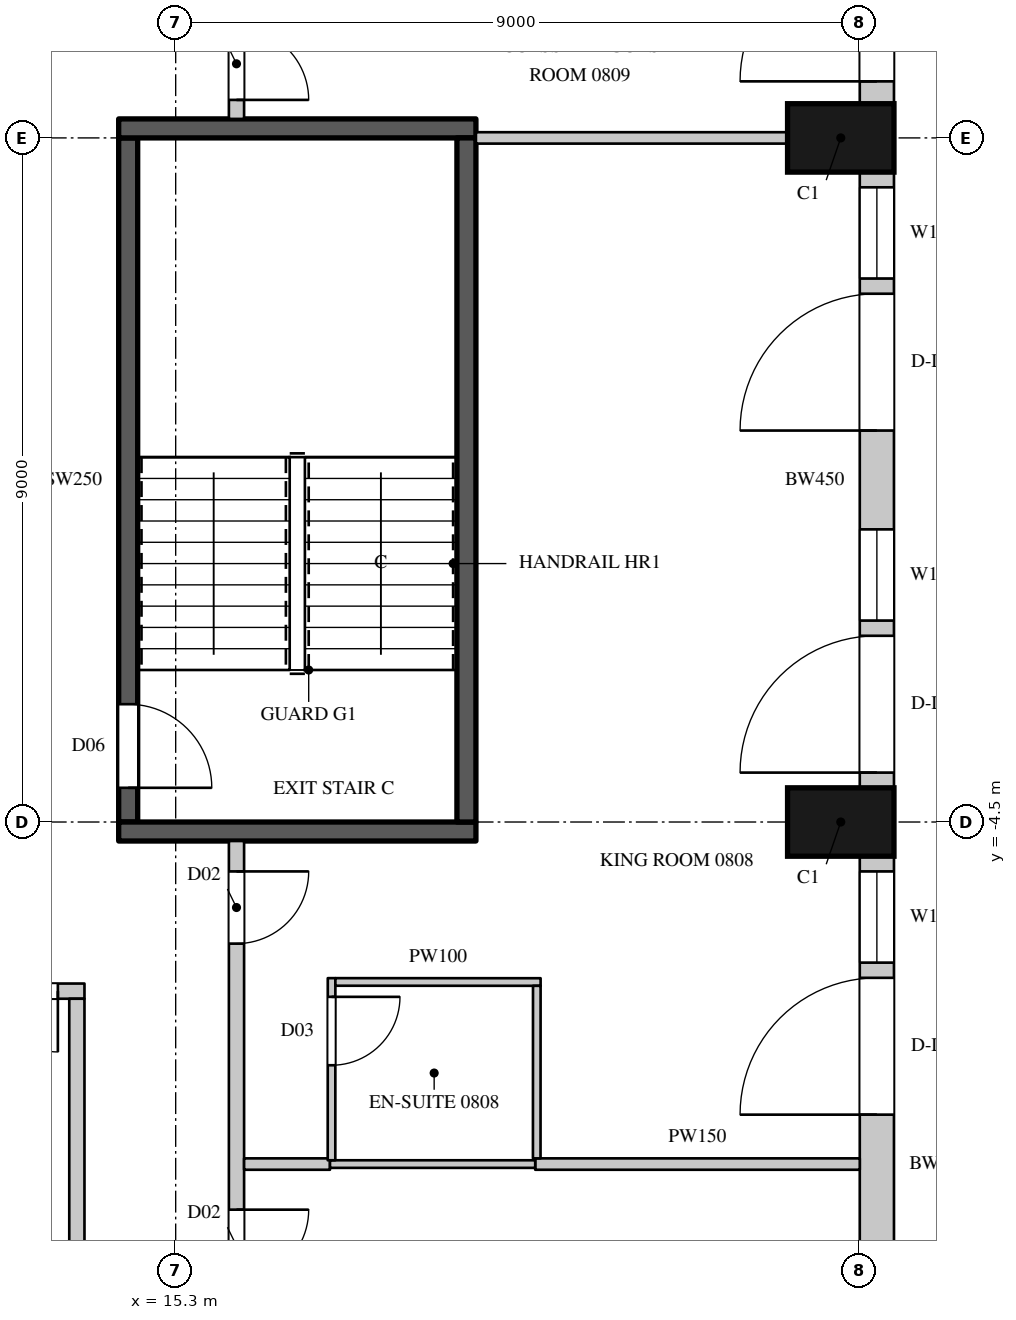
"""IFC4 building model, lengths in metres.
Left out: names, types, materials, properties, quantities, classifications, styles, units other than length and angle.
Written with IfcOpenShell. Run it as: python <this file> out.ifc"""

import sys

from ifc_helpers import new_model, si_unit, direction, frame, frame_2d, origin, origin_2d, place, context, subcontext, project, spatial, rectangle, extrude, element, fill, save


model = new_model("IFC4")
c1 = context("Model", 3, precision=1e-05, world=origin(), true_north=direction((0.0, 1.0)))
c2 = subcontext(c1, "Body", "Model", "MODEL_VIEW")
j1 = project(units=[si_unit("LENGTHUNIT", "METRE"), si_unit("PLANEANGLEUNIT", "RADIAN")], contexts=[c1])
p1 = place(None, origin())
s1 = spatial("IfcSite", under=j1, at=p1, CompositionType="ELEMENT")
p2 = place(p1, origin())
s2 = spatial("IfcBuilding", under=s1, at=p2, CompositionType="ELEMENT")
p3 = place(p2, frame((0.0, 0.0, 59.1)))
s3 = spatial("IfcBuildingStorey", under=s2, at=p3, CompositionType="ELEMENT", Elevation=59.1)
for number, where, z_axis, x_axis in (
    (1, (24.05, -4.5, 0.0), (0.0, 0.0, 1.0), (0.0, 1.0, 0.0)),
    (2, (24.05, 4.5, 0.0), (0.0, 0.0, 1.0), (0.0, 1.0, 0.0)),
):
    element("IfcColumn", number, at=place(p3, frame(where, z_axis=z_axis, x_axis=x_axis)), inside=s3, PredefinedType="COLUMN", context=c2, shape_type="SweptSolid", body=[
        extrude(rectangle(XDim=0.9, YDim=1.4, at=origin_2d()), origin(), (0.0, 0.0, 1.0), 3.6),
    ])
p4 = place(p3, frame((24.525, -13.05, 0.0), z_axis=(0.0, 0.0, 1.0), x_axis=(0.0, 1.0, 0.0)))
e3 = element("IfcWall", 3, at=p4, inside=s3, PredefinedType="SOLIDWALL", context=c2, shape_type="SweptSolid", body=[
    extrude(rectangle(XDim=8.1, YDim=0.45, at=frame_2d((4.05, 0.0))), origin(), (0.0, 0.0, 1.0), 3.3),
])
p5 = place(p4, frame((0.9, 0.0, 0.0)))
e4 = element("IfcOpeningElement", 4, at=p5, cuts=e3, PredefinedType="OPENING", context=c2, shape_type="SweptSolid", body=[
    extrude(rectangle(XDim=1.8, YDim=2.4, at=frame_2d((0.9, 1.2))), frame((0.0, 0.235, 0.0), z_axis=(0.0, -1.0, 0.0), x_axis=(1.0, 0.0, 0.0)), (0.0, 0.0, 1.0), 0.47),
])
p6 = place(p4, frame((4.7, 0.0, 0.0)))
e5 = element("IfcOpeningElement", 5, at=p6, cuts=e3, PredefinedType="OPENING", context=c2, shape_type="SweptSolid", body=[
    extrude(rectangle(XDim=1.8, YDim=2.4, at=frame_2d((0.9, 1.2))), frame((0.0, 0.235, 0.0), z_axis=(0.0, -1.0, 0.0), x_axis=(1.0, 0.0, 0.0)), (0.0, 0.0, 1.0), 0.47),
])
p7 = place(p4, frame((6.7, 0.0, 1.05)))
e6 = element("IfcOpeningElement", 6, at=p7, cuts=e3, PredefinedType="OPENING", context=c2, shape_type="SweptSolid", body=[
    extrude(rectangle(XDim=1.2, YDim=2.0, at=frame_2d((0.6, 1.0))), frame((0.0, 0.235, 0.0), z_axis=(0.0, -1.0, 0.0), x_axis=(1.0, 0.0, 0.0)), (0.0, 0.0, 1.0), 0.47),
])
p8 = place(p3, frame((24.525, -4.05, 0.0), z_axis=(0.0, 0.0, 1.0), x_axis=(0.0, 1.0, 0.0)))
e7 = element("IfcWall", 7, at=p8, inside=s3, PredefinedType="SOLIDWALL", context=c2, shape_type="SweptSolid", body=[
    extrude(rectangle(XDim=8.1, YDim=0.45, at=frame_2d((4.05, 0.0))), origin(), (0.0, 0.0, 1.0), 3.3),
])
p9 = place(p8, frame((0.2, 0.0, 0.0)))
e8 = element("IfcOpeningElement", 8, at=p9, cuts=e7, PredefinedType="OPENING", context=c2, shape_type="SweptSolid", body=[
    extrude(rectangle(XDim=1.8, YDim=2.4, at=frame_2d((0.9, 1.2))), frame((0.0, 0.235, 0.0), z_axis=(0.0, -1.0, 0.0), x_axis=(1.0, 0.0, 0.0)), (0.0, 0.0, 1.0), 0.47),
])
p10 = place(p8, frame((2.2, 0.0, 1.05)))
e9 = element("IfcOpeningElement", 9, at=p10, cuts=e7, PredefinedType="OPENING", context=c2, shape_type="SweptSolid", body=[
    extrude(rectangle(XDim=1.2, YDim=2.0, at=frame_2d((0.6, 1.0))), frame((0.0, 0.235, 0.0), z_axis=(0.0, -1.0, 0.0), x_axis=(1.0, 0.0, 0.0)), (0.0, 0.0, 1.0), 0.47),
])
p11 = place(p8, frame((4.7, 0.0, 0.0)))
e10 = element("IfcOpeningElement", 10, at=p11, cuts=e7, PredefinedType="OPENING", context=c2, shape_type="SweptSolid", body=[
    extrude(rectangle(XDim=1.8, YDim=2.4, at=frame_2d((0.9, 1.2))), frame((0.0, 0.235, 0.0), z_axis=(0.0, -1.0, 0.0), x_axis=(1.0, 0.0, 0.0)), (0.0, 0.0, 1.0), 0.47),
])
p12 = place(p8, frame((6.7, 0.0, 1.05)))
e11 = element("IfcOpeningElement", 11, at=p12, cuts=e7, PredefinedType="OPENING", context=c2, shape_type="SweptSolid", body=[
    extrude(rectangle(XDim=1.2, YDim=2.0, at=frame_2d((0.6, 1.0))), frame((0.0, 0.235, 0.0), z_axis=(0.0, -1.0, 0.0), x_axis=(1.0, 0.0, 0.0)), (0.0, 0.0, 1.0), 0.47),
])
p13 = place(p3, frame((24.525, 4.95, 0.0), z_axis=(0.0, 0.0, 1.0), x_axis=(0.0, 1.0, 0.0)))
e12 = element("IfcWall", 12, at=p13, inside=s3, PredefinedType="SOLIDWALL", context=c2, shape_type="SweptSolid", body=[
    extrude(rectangle(XDim=8.439, YDim=0.45, at=frame_2d((4.219, 0.0))), origin(), (0.0, 0.0, 1.0), 3.3),
])
p14 = place(p13, frame((0.294, 0.0, 0.0)))
e13 = element("IfcOpeningElement", 13, at=p14, cuts=e12, PredefinedType="OPENING", context=c2, shape_type="SweptSolid", body=[
    extrude(rectangle(XDim=1.8, YDim=2.4, at=frame_2d((0.9, 1.2))), frame((0.0, 0.235, 0.0), z_axis=(0.0, -1.0, 0.0), x_axis=(1.0, 0.0, 0.0)), (0.0, 0.0, 1.0), 0.47),
])
p15 = place(p13, frame((2.294, 0.0, 1.05)))
e14 = element("IfcOpeningElement", 14, at=p15, cuts=e12, PredefinedType="OPENING", context=c2, shape_type="SweptSolid", body=[
    extrude(rectangle(XDim=1.2, YDim=2.0, at=frame_2d((0.6, 1.0))), frame((0.0, 0.235, 0.0), z_axis=(0.0, -1.0, 0.0), x_axis=(1.0, 0.0, 0.0)), (0.0, 0.0, 1.0), 0.47),
])
p16 = place(p13, frame((5.232, 0.0, 1.05)))
e15 = element("IfcOpeningElement", 15, at=p16, cuts=e12, PredefinedType="OPENING", context=c2, shape_type="SweptSolid", body=[
    extrude(rectangle(XDim=2.7, YDim=2.0, at=frame_2d((1.35, 1.0))), frame((0.0, 0.235, 0.0), z_axis=(0.0, -1.0, 0.0), x_axis=(1.0, 0.0, 0.0)), (0.0, 0.0, 1.0), 0.47),
])
p17 = place(p3, frame((10.5, -6.725, 0.0), z_axis=(0.0, 0.0, 1.0), x_axis=(1.0, 0.0, 0.0)))
e16 = element("IfcWall", 16, at=p17, inside=s3, PredefinedType="PARTITIONING", context=c2, shape_type="SweptSolid", body=[
    extrude(rectangle(XDim=3.6, YDim=0.2, at=frame_2d((1.8, 0.0))), origin(), (0.0, 0.0, 1.0), 3.3),
])
p18 = place(p17, frame((1.65, 0.0, 0.0)))
e17 = element("IfcOpeningElement", 17, at=p18, cuts=e16, PredefinedType="OPENING", context=c2, shape_type="SweptSolid", body=[
    extrude(rectangle(XDim=1.6, YDim=2.4, at=frame_2d((0.8, 1.2))), frame((0.0, 0.11, 0.0), z_axis=(0.0, -1.0, 0.0), x_axis=(1.0, 0.0, 0.0)), (0.0, 0.0, 1.0), 0.22),
])
p19 = place(p3, frame((14.0, -15.3, 0.0), z_axis=(0.0, 0.0, 1.0), x_axis=(0.0, 1.0, 0.0)))
e18 = element("IfcWall", 18, at=p19, inside=s3, PredefinedType="PARTITIONING", context=c2, shape_type="SweptSolid", body=[
    extrude(rectangle(XDim=8.475, YDim=0.2, at=frame_2d((4.238, 0.0))), origin(), (0.0, 0.0, 1.0), 3.3),
])
p20 = place(p3, frame((16.1, -17.5, 0.0), z_axis=(0.0, 0.0, 1.0), x_axis=(0.0, 1.0, 0.0)))
e19 = element("IfcWall", 19, at=p20, inside=s3, PredefinedType="PARTITIONING", context=c2, shape_type="SweptSolid", body=[
    extrude(rectangle(XDim=12.75, YDim=0.2, at=frame_2d((6.375, 0.0))), origin(), (0.0, 0.0, 1.0), 3.3),
])
p21 = place(p20, frame((2.75, 0.0, 0.0)))
e20 = element("IfcOpeningElement", 20, at=p21, cuts=e19, PredefinedType="OPENING", context=c2, shape_type="SweptSolid", body=[
    extrude(rectangle(XDim=0.95, YDim=2.2, at=frame_2d((0.475, 1.1))), frame((0.0, 0.11, 0.0), z_axis=(0.0, -1.0, 0.0), x_axis=(1.0, 0.0, 0.0)), (0.0, 0.0, 1.0), 0.22),
])
p22 = place(p20, frame((6.95, 0.0, 0.0)))
e21 = element("IfcOpeningElement", 21, at=p22, cuts=e19, PredefinedType="OPENING", context=c2, shape_type="SweptSolid", body=[
    extrude(rectangle(XDim=0.95, YDim=2.2, at=frame_2d((0.475, 1.1))), frame((0.0, 0.11, 0.0), z_axis=(0.0, -1.0, 0.0), x_axis=(1.0, 0.0, 0.0)), (0.0, 0.0, 1.0), 0.22),
])
p23 = place(p20, frame((11.4, 0.0, 0.0)))
e22 = element("IfcOpeningElement", 22, at=p23, cuts=e19, PredefinedType="OPENING", context=c2, shape_type="SweptSolid", body=[
    extrude(rectangle(XDim=0.95, YDim=2.2, at=frame_2d((0.475, 1.1))), frame((0.0, 0.11, 0.0), z_axis=(0.0, -1.0, 0.0), x_axis=(1.0, 0.0, 0.0)), (0.0, 0.0, 1.0), 0.22),
])
p24 = place(p3, frame((16.1, 4.75, 0.0), z_axis=(0.0, 0.0, 1.0), x_axis=(0.0, 1.0, 0.0)))
e23 = element("IfcWall", 23, at=p24, inside=s3, PredefinedType="PARTITIONING", context=c2, shape_type="SweptSolid", body=[
    extrude(rectangle(XDim=12.65, YDim=0.2, at=frame_2d((6.325, 0.0))), origin(), (0.0, 0.0, 1.0), 3.3),
])
p25 = place(p24, frame((0.25, 0.0, 0.0)))
e24 = element("IfcOpeningElement", 24, at=p25, cuts=e23, PredefinedType="OPENING", context=c2, shape_type="SweptSolid", body=[
    extrude(rectangle(XDim=0.95, YDim=2.2, at=frame_2d((0.475, 1.1))), frame((0.0, 0.11, 0.0), z_axis=(0.0, -1.0, 0.0), x_axis=(1.0, 0.0, 0.0)), (0.0, 0.0, 1.0), 0.22),
])
p26 = place(p24, frame((6.9, 0.0, 0.0)))
e25 = element("IfcOpeningElement", 25, at=p26, cuts=e23, PredefinedType="OPENING", context=c2, shape_type="SweptSolid", body=[
    extrude(rectangle(XDim=0.95, YDim=2.2, at=frame_2d((0.475, 1.1))), frame((0.0, 0.11, 0.0), z_axis=(0.0, -1.0, 0.0), x_axis=(1.0, 0.0, 0.0)), (0.0, 0.0, 1.0), 0.22),
])
p27 = place(p3, frame((16.2, -9.0, 0.0), z_axis=(0.0, 0.0, 1.0), x_axis=(1.0, 0.0, 0.0)))
e26 = element("IfcWall", 26, at=p27, inside=s3, PredefinedType="PARTITIONING", context=c2, shape_type="SweptSolid", body=[
    extrude(rectangle(XDim=1.13, YDim=0.15, at=frame_2d((0.565, 0.0))), origin(), (0.0, 0.0, 1.0), 2.65),
])
p28 = place(p3, frame((19.25, 4.5, 0.0), z_axis=(0.0, 0.0, 1.0), x_axis=(1.0, 0.0, 0.0)))
e27 = element("IfcWall", 27, at=p28, inside=s3, PredefinedType="PARTITIONING", context=c2, shape_type="SweptSolid", body=[
    extrude(rectangle(XDim=4.1, YDim=0.15, at=frame_2d((2.05, 0.0))), origin(), (0.0, 0.0, 1.0), 3.3),
])
p29 = place(p3, frame((20.03, -9.0, 0.0), z_axis=(0.0, 0.0, 1.0), x_axis=(1.0, 0.0, 0.0)))
e28 = element("IfcWall", 28, at=p29, inside=s3, PredefinedType="PARTITIONING", context=c2, shape_type="SweptSolid", body=[
    extrude(rectangle(XDim=4.27, YDim=0.15, at=frame_2d((2.135, 0.0))), origin(), (0.0, 0.0, 1.0), 2.65),
])
p30 = place(p3, frame((14.675, -4.5, 0.0), z_axis=(0.0, 0.0, 1.0), x_axis=(0.0, 1.0, 0.0)))
e29 = element("IfcWall", 29, at=p30, inside=s3, PredefinedType="SHEAR", context=c2, shape_type="SweptSolid", body=[
    extrude(rectangle(XDim=9.0, YDim=0.25, at=frame_2d((4.5, 0.0))), origin(), (0.0, 0.0, 1.0), 3.3),
])
p31 = place(p30, frame((0.45, 0.0, 0.0)))
e30 = element("IfcOpeningElement", 30, at=p31, cuts=e29, PredefinedType="OPENING", context=c2, shape_type="SweptSolid", body=[
    extrude(rectangle(XDim=1.1, YDim=2.2, at=frame_2d((0.55, 1.1))), frame((0.0, 0.135, 0.0), z_axis=(0.0, -1.0, 0.0), x_axis=(1.0, 0.0, 0.0)), (0.0, 0.0, 1.0), 0.27),
])
for number, where, z_axis, x_axis in (
    (31, (14.55, -4.625, 0.0), (0.0, 0.0, 1.0), (1.0, 0.0, 0.0)),
    (32, (14.55, 4.625, 0.0), (0.0, 0.0, 1.0), (1.0, 0.0, 0.0)),
):
    element("IfcWall", number, at=place(p3, frame(where, z_axis=z_axis, x_axis=x_axis)), inside=s3, PredefinedType="SHEAR", context=c2, shape_type="SweptSolid", body=[
        extrude(rectangle(XDim=4.7, YDim=0.25, at=frame_2d((2.35, 0.0))), origin(), (0.0, 0.0, 1.0), 3.3),
    ])
p32 = place(p3, frame((19.125, -4.5, 0.0), z_axis=(0.0, 0.0, 1.0), x_axis=(0.0, 1.0, 0.0)))
e33 = element("IfcWall", 33, at=p32, inside=s3, PredefinedType="SHEAR", context=c2, shape_type="SweptSolid", body=[
    extrude(rectangle(XDim=9.0, YDim=0.25, at=frame_2d((4.5, 0.0))), origin(), (0.0, 0.0, 1.0), 3.3),
])
p33 = place(p3, frame((17.33, -9.0, 0.0), z_axis=(0.0, 0.0, 1.0), x_axis=(1.0, 0.0, 0.0)))
e34 = element("IfcWall", 34, at=p33, inside=s3, PredefinedType="PARTITIONING", context=c2, shape_type="SweptSolid", body=[
    extrude(rectangle(XDim=2.7, YDim=0.1, at=frame_2d((1.35, 0.0))), origin(), (0.0, 0.0, 1.0), 2.65),
])
p34 = place(p3, frame((17.35, -8.95, 0.0), z_axis=(0.0, 0.0, 1.0), x_axis=(0.000407580973, 0.999999916939, 0.0)))
e35 = element("IfcWall", 35, at=p34, inside=s3, PredefinedType="PARTITIONING", context=c2, shape_type="SweptSolid", body=[
    extrude(rectangle(XDim=2.396, YDim=0.1, at=frame_2d((1.198, 0.0))), origin(), (0.0, 0.0, 1.0), 3.3),
])
p35 = place(p34, frame((1.25, 0.0, 0.0)))
e36 = element("IfcOpeningElement", 36, at=p35, cuts=e35, PredefinedType="OPENING", context=c2, shape_type="SweptSolid", body=[
    extrude(rectangle(XDim=0.9, YDim=2.2, at=frame_2d((0.45, 1.1))), frame((0.0, 0.06, 0.0), z_axis=(0.0, -1.0, 0.0), x_axis=(1.0, 0.0, 0.0)), (0.0, 0.0, 1.0), 0.12),
])
p36 = place(p3, frame((17.401, -6.604, 0.0), z_axis=(0.0, 0.0, 1.0), x_axis=(0.9999999346, -0.000361663629, 0.0)))
e37 = element("IfcWall", 37, at=p36, inside=s3, PredefinedType="PARTITIONING", context=c2, shape_type="SweptSolid", body=[
    extrude(rectangle(XDim=2.7, YDim=0.1, at=frame_2d((1.35, 0.0))), origin(), (0.0, 0.0, 1.0), 3.3),
])
p37 = place(p3, frame((20.05, -8.925, 0.0), z_axis=(0.0, 0.0, 1.0), x_axis=(0.000430200003, 0.999999907464, 0.0)))
e38 = element("IfcWall", 38, at=p37, inside=s3, PredefinedType="PARTITIONING", context=c2, shape_type="SweptSolid", body=[
    extrude(rectangle(XDim=2.27, YDim=0.1, at=frame_2d((1.135, 0.0))), origin(), (0.0, 0.0, 1.0), 3.3),
])
p38 = place(p6, origin())
e39 = element("IfcDoor", 39, at=p38, inside=s3, OperationType="SLIDING_TO_LEFT", PredefinedType="DOOR", context=c2, shape_type="SweptSolid", body=[
    extrude(rectangle(XDim=1.8, YDim=2.4, at=frame_2d((0.9, 1.2))), frame((0.0, 0.13, 0.0), z_axis=(0.0, -1.0, 0.0), x_axis=(1.0, 0.0, 0.0)), (0.0, 0.0, 1.0), 0.05),
])
fill(e5, e39)
p39 = place(p7, origin())
e40 = element("IfcWindow", 40, at=p39, inside=s3, PartitioningType="SINGLE_PANEL", PredefinedType="WINDOW", context=c2, shape_type="SweptSolid", body=[
    extrude(rectangle(XDim=1.2, YDim=2.0, at=frame_2d((0.6, 1.0))), frame((0.0, 0.135, 0.0), z_axis=(0.0, -1.0, 0.0), x_axis=(1.0, 0.0, 0.0)), (0.0, 0.0, 1.0), 0.06),
])
fill(e6, e40)
p40 = place(p9, origin())
e41 = element("IfcDoor", 41, at=p40, inside=s3, OperationType="SLIDING_TO_LEFT", PredefinedType="DOOR", context=c2, shape_type="SweptSolid", body=[
    extrude(rectangle(XDim=1.8, YDim=2.4, at=frame_2d((0.9, 1.2))), frame((0.0, 0.13, 0.0), z_axis=(0.0, -1.0, 0.0), x_axis=(1.0, 0.0, 0.0)), (0.0, 0.0, 1.0), 0.05),
])
fill(e8, e41)
p41 = place(p10, origin())
e42 = element("IfcWindow", 42, at=p41, inside=s3, PartitioningType="SINGLE_PANEL", PredefinedType="WINDOW", context=c2, shape_type="SweptSolid", body=[
    extrude(rectangle(XDim=1.2, YDim=2.0, at=frame_2d((0.6, 1.0))), frame((0.0, 0.135, 0.0), z_axis=(0.0, -1.0, 0.0), x_axis=(1.0, 0.0, 0.0)), (0.0, 0.0, 1.0), 0.06),
])
fill(e9, e42)
p42 = place(p11, origin())
e43 = element("IfcDoor", 43, at=p42, inside=s3, OperationType="SLIDING_TO_LEFT", PredefinedType="DOOR", context=c2, shape_type="SweptSolid", body=[
    extrude(rectangle(XDim=1.8, YDim=2.4, at=frame_2d((0.9, 1.2))), frame((0.0, 0.13, 0.0), z_axis=(0.0, -1.0, 0.0), x_axis=(1.0, 0.0, 0.0)), (0.0, 0.0, 1.0), 0.05),
])
fill(e10, e43)
p43 = place(p12, origin())
e44 = element("IfcWindow", 44, at=p43, inside=s3, PartitioningType="SINGLE_PANEL", PredefinedType="WINDOW", context=c2, shape_type="SweptSolid", body=[
    extrude(rectangle(XDim=1.2, YDim=2.0, at=frame_2d((0.6, 1.0))), frame((0.0, 0.135, 0.0), z_axis=(0.0, -1.0, 0.0), x_axis=(1.0, 0.0, 0.0)), (0.0, 0.0, 1.0), 0.06),
])
fill(e11, e44)
p44 = place(p14, origin())
e45 = element("IfcDoor", 45, at=p44, inside=s3, OperationType="SLIDING_TO_LEFT", PredefinedType="DOOR", context=c2, shape_type="SweptSolid", body=[
    extrude(rectangle(XDim=1.8, YDim=2.4, at=frame_2d((0.9, 1.2))), frame((0.0, 0.13, 0.0), z_axis=(0.0, -1.0, 0.0), x_axis=(1.0, 0.0, 0.0)), (0.0, 0.0, 1.0), 0.05),
])
fill(e13, e45)
p45 = place(p18, origin())
e46 = element("IfcDoor", 46, at=p45, inside=s3, OperationType="DOUBLE_DOOR_SINGLE_SWING", PredefinedType="DOOR", context=c2, shape_type="SweptSolid", body=[
    extrude(rectangle(XDim=1.6, YDim=2.4, at=frame_2d((0.8, 1.2))), frame((0.0, 0.025, 0.0), z_axis=(0.0, -1.0, 0.0), x_axis=(1.0, 0.0, 0.0)), (0.0, 0.0, 1.0), 0.05),
])
fill(e17, e46)
p46 = place(p22, origin())
e47 = element("IfcDoor", 47, at=p46, inside=s3, OperationType="SINGLE_SWING_LEFT", PredefinedType="DOOR", context=c2, shape_type="SweptSolid", body=[
    extrude(rectangle(XDim=0.95, YDim=2.2, at=frame_2d((0.475, 1.1))), frame((0.0, 0.025, 0.0), z_axis=(0.0, -1.0, 0.0), x_axis=(1.0, 0.0, 0.0)), (0.0, 0.0, 1.0), 0.05),
])
fill(e21, e47)
p47 = place(p23, origin())
e48 = element("IfcDoor", 48, at=p47, inside=s3, OperationType="SINGLE_SWING_LEFT", PredefinedType="DOOR", context=c2, shape_type="SweptSolid", body=[
    extrude(rectangle(XDim=0.95, YDim=2.2, at=frame_2d((0.475, 1.1))), frame((0.0, 0.025, 0.0), z_axis=(0.0, -1.0, 0.0), x_axis=(1.0, 0.0, 0.0)), (0.0, 0.0, 1.0), 0.05),
])
fill(e22, e48)
p48 = place(p35, origin())
e49 = element("IfcDoor", 49, at=p48, inside=s3, OperationType="SINGLE_SWING_LEFT", PredefinedType="DOOR", context=c2, shape_type="SweptSolid", body=[
    extrude(rectangle(XDim=0.9, YDim=2.2, at=frame_2d((0.45, 1.1))), frame((0.0, 0.025, 0.0), z_axis=(0.0, -1.0, 0.0), x_axis=(1.0, 0.0, 0.0)), (0.0, 0.0, 1.0), 0.05),
])
fill(e36, e49)
p49 = place(p25, origin())
e50 = element("IfcDoor", 50, at=p49, inside=s3, OperationType="SINGLE_SWING_RIGHT", PredefinedType="DOOR", context=c2, shape_type="SweptSolid", body=[
    extrude(rectangle(XDim=0.95, YDim=2.2, at=frame_2d((0.475, 1.1))), frame((0.0, 0.025, 0.0), z_axis=(0.0, -1.0, 0.0), x_axis=(1.0, 0.0, 0.0)), (0.0, 0.0, 1.0), 0.05),
])
fill(e24, e50)
p50 = place(p31, origin())
e51 = element("IfcDoor", 51, at=p50, inside=s3, OperationType="SINGLE_SWING_RIGHT", PredefinedType="DOOR", context=c2, shape_type="SweptSolid", body=[
    extrude(rectangle(XDim=1.1, YDim=2.2, at=frame_2d((0.55, 1.1))), frame((0.0, 0.025, 0.0), z_axis=(0.0, -1.0, 0.0), x_axis=(1.0, 0.0, 0.0)), (0.0, 0.0, 1.0), 0.05),
])
fill(e30, e51)
save(model, sys.argv[1])
